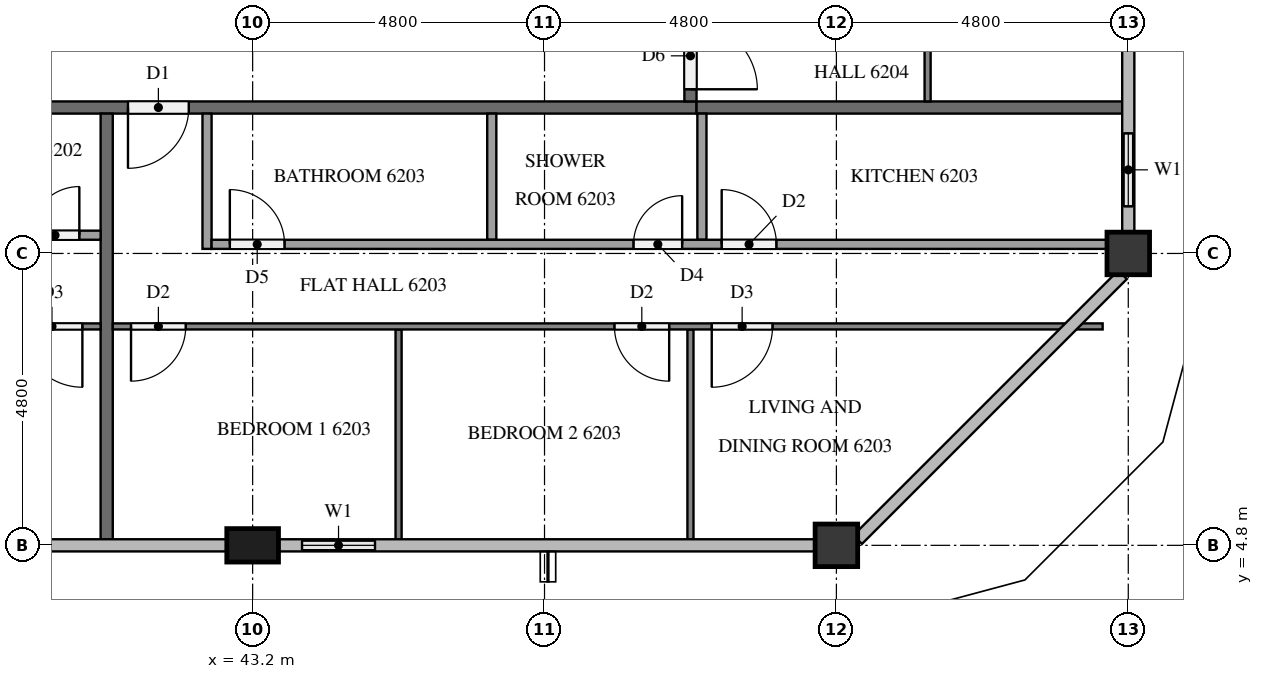
"""IFC4 building model, lengths in metres.
Left out: names, types, materials, properties, quantities, classifications, styles, units other than length and angle.
Written with IfcOpenShell. Run it as: python <this file> out.ifc"""

import sys

from ifc_helpers import new_model, si_unit, direction, frame, frame_2d, origin, origin_2d, place, context, subcontext, project, spatial, rectangle, extrude, element, fill, save


model = new_model("IFC4")
c1 = context("Model", 3, precision=1e-05, world=origin(), true_north=direction((0.0, 1.0)))
c2 = subcontext(c1, "Body", "Model", "MODEL_VIEW")
j1 = project(units=[si_unit("LENGTHUNIT", "METRE"), si_unit("PLANEANGLEUNIT", "RADIAN")], contexts=[c1])
p1 = place(None, origin())
s1 = spatial("IfcSite", under=j1, at=p1, CompositionType="ELEMENT")
p2 = place(p1, origin())
s2 = spatial("IfcBuilding", under=s1, at=p2, CompositionType="ELEMENT")
p3 = place(p2, frame((0.0, 0.0, 238.7)))
s3 = spatial("IfcBuildingStorey", under=s2, at=p3, CompositionType="ELEMENT", Elevation=238.7)
p4 = place(p3, frame((43.2, 4.8, 0.0), z_axis=(0.0, 0.0, 1.0), x_axis=(1.0, 0.0, 0.0)))
e1 = element("IfcColumn", 1, at=p4, inside=s3, PredefinedType="COLUMN", context=c2, shape_type="SweptSolid", body=[
    extrude(rectangle(XDim=0.85, YDim=0.55, at=origin_2d()), origin(), (0.0, 0.0, 1.0), 3.2),
])
for number, where, z_axis, x_axis in (
    (2, (52.8, 4.8, 0.0), (0.0, 0.0, 1.0), (1.0, 0.0, 0.0)),
    (3, (57.6, 9.6, 0.0), (0.0, 0.0, 1.0), (1.0, 0.0, 0.0)),
):
    element("IfcColumn", number, at=place(p3, frame(where, z_axis=z_axis, x_axis=x_axis)), inside=s3, PredefinedType="COLUMN", context=c2, shape_type="SweptSolid", body=[
        extrude(rectangle(XDim=0.7, YDim=0.7, at=origin_2d()), origin(), (0.0, 0.0, 1.0), 3.2),
    ])
p5 = place(p3, frame((43.625, 4.8, 0.0), z_axis=(0.0, 0.0, 1.0), x_axis=(1.0, 0.0, 0.0)))
e4 = element("IfcWall", 4, at=p5, inside=s3, PredefinedType="SOLIDWALL", context=c2, shape_type="SweptSolid", body=[
    extrude(rectangle(XDim=1.975, YDim=0.15, at=frame_2d((0.988, 0.0))), origin(), (0.0, 0.0, 1.0), 3.2),
])
p6 = place(p5, frame((0.387, 0.0, 0.9)))
e5 = element("IfcOpeningElement", 5, at=p6, cuts=e4, PredefinedType="OPENING", context=c2, shape_type="SweptSolid", body=[
    extrude(rectangle(XDim=1.2, YDim=1.4, at=frame_2d((0.6, 0.7))), frame((0.0, 0.085, 0.0), z_axis=(0.0, -1.0, 0.0), x_axis=(1.0, 0.0, 0.0)), (0.0, 0.0, 1.0), 0.17),
])
p7 = place(p3, frame((57.6, 9.95, 0.0), z_axis=(0.0, 0.0, 1.0), x_axis=(0.0, 1.0, 0.0)))
e6 = element("IfcWall", 6, at=p7, inside=s3, PredefinedType="SOLIDWALL", context=c2, shape_type="SweptSolid", body=[
    extrude(rectangle(XDim=2.05, YDim=0.15, at=frame_2d((1.025, 0.0))), origin(), (0.0, 0.0, 1.0), 3.2),
])
p8 = place(p7, frame((0.425, 0.0, 0.9)))
e7 = element("IfcOpeningElement", 7, at=p8, cuts=e6, PredefinedType="OPENING", context=c2, shape_type="SweptSolid", body=[
    extrude(rectangle(XDim=1.2, YDim=1.4, at=frame_2d((0.6, 0.7))), frame((0.0, 0.085, 0.0), z_axis=(0.0, -1.0, 0.0), x_axis=(1.0, 0.0, 0.0)), (0.0, 0.0, 1.0), 0.17),
])
p9 = place(p3, frame((50.5, 12.0, 0.0), z_axis=(0.0, 0.0, 1.0), x_axis=(-1.0, 0.0, 0.0)))
e8 = element("IfcWall", 8, at=p9, inside=s3, PredefinedType="PARTITIONING", context=c2, shape_type="SweptSolid", body=[
    extrude(rectangle(XDim=38.6, YDim=0.2, at=frame_2d((19.3, 0.0))), origin(), (0.0, 0.0, 1.0), 3.2),
])
p10 = place(p9, frame((37.1, 0.0, 0.0)))
e9 = element("IfcOpeningElement", 9, at=p10, cuts=e8, PredefinedType="OPENING", context=c2, shape_type="SweptSolid", body=[
    extrude(rectangle(XDim=1.1, YDim=2.1, at=frame_2d((0.55, 1.05))), frame((0.0, 0.11, 0.0), z_axis=(0.0, -1.0, 0.0), x_axis=(1.0, 0.0, 0.0)), (0.0, 0.0, 1.0), 0.22),
])
p11 = place(p9, frame((17.95, 0.0, 0.0)))
e10 = element("IfcOpeningElement", 10, at=p11, cuts=e8, PredefinedType="OPENING", context=c2, shape_type="SweptSolid", body=[
    extrude(rectangle(XDim=1.0, YDim=2.1, at=frame_2d((0.5, 1.05))), frame((0.0, 0.11, 0.0), z_axis=(0.0, -1.0, 0.0), x_axis=(1.0, 0.0, 0.0)), (0.0, 0.0, 1.0), 0.22),
])
p12 = place(p9, frame((8.35, 0.0, 0.0)))
e11 = element("IfcOpeningElement", 11, at=p12, cuts=e8, PredefinedType="OPENING", context=c2, shape_type="SweptSolid", body=[
    extrude(rectangle(XDim=1.0, YDim=2.1, at=frame_2d((0.5, 1.05))), frame((0.0, 0.11, 0.0), z_axis=(0.0, -1.0, 0.0), x_axis=(1.0, 0.0, 0.0)), (0.0, 0.0, 1.0), 0.22),
])
p13 = place(p3, frame((50.4, 40.7, 0.0), z_axis=(0.0, 0.0, 1.0), x_axis=(0.0, -1.0, 0.0)))
e12 = element("IfcWall", 12, at=p13, inside=s3, PredefinedType="PARTITIONING", context=c2, shape_type="SweptSolid", body=[
    extrude(rectangle(XDim=28.6, YDim=0.2, at=frame_2d((14.3, 0.0))), origin(), (0.0, 0.0, 1.0), 3.2),
])
p14 = place(p13, frame((27.3, 0.0, 0.0)))
e13 = element("IfcOpeningElement", 13, at=p14, cuts=e12, PredefinedType="OPENING", context=c2, shape_type="SweptSolid", body=[
    extrude(rectangle(XDim=1.1, YDim=2.1, at=frame_2d((0.55, 1.05))), frame((0.0, 0.11, 0.0), z_axis=(0.0, -1.0, 0.0), x_axis=(1.0, 0.0, 0.0)), (0.0, 0.0, 1.0), 0.22),
])
p15 = place(p13, frame((0.25, 0.0, 0.0)))
e14 = element("IfcOpeningElement", 14, at=p15, cuts=e12, PredefinedType="OPENING", context=c2, shape_type="SweptSolid", body=[
    extrude(rectangle(XDim=1.0, YDim=2.1, at=frame_2d((0.5, 1.05))), frame((0.0, 0.11, 0.0), z_axis=(0.0, -1.0, 0.0), x_axis=(1.0, 0.0, 0.0)), (0.0, 0.0, 1.0), 0.22),
])
for number, where, z_axis, x_axis in (
    (15, (40.8, 11.9, 0.0), (0.0, 0.0, 1.0), (0.0, -1.0, 0.0)),
    (16, (50.5, 12.0, 0.0), (0.0, 0.0, 1.0), (1.0, 0.0, 0.0)),
):
    element("IfcWall", number, at=place(p3, frame(where, z_axis=z_axis, x_axis=x_axis)), inside=s3, PredefinedType="PARTITIONING", context=c2, shape_type="SweptSolid", body=[
        extrude(rectangle(XDim=7.0, YDim=0.2, at=frame_2d((3.5, 0.0))), origin(), (0.0, 0.0, 1.0), 3.2),
    ])
p16 = place(p3, frame((40.7, 8.4, 0.0), z_axis=(0.0, 0.0, 1.0), x_axis=(-1.0, 0.0, 0.0)))
e17 = element("IfcWall", 17, at=p16, inside=s3, PredefinedType="PARTITIONING", context=c2, shape_type="SweptSolid", body=[
    extrude(rectangle(XDim=9.4, YDim=0.1, at=frame_2d((4.7, 0.0))), origin(), (0.0, 0.0, 1.0), 3.2),
])
p17 = place(p16, frame((8.2, 0.0, 0.0)))
e18 = element("IfcOpeningElement", 18, at=p17, cuts=e17, PredefinedType="OPENING", context=c2, shape_type="SweptSolid", body=[
    extrude(rectangle(XDim=0.9, YDim=2.1, at=frame_2d((0.45, 1.05))), frame((0.0, 0.06, 0.0), z_axis=(0.0, -1.0, 0.0), x_axis=(1.0, 0.0, 0.0)), (0.0, 0.0, 1.0), 0.12),
])
p18 = place(p16, frame((0.3, 0.0, 0.0)))
e19 = element("IfcOpeningElement", 19, at=p18, cuts=e17, PredefinedType="OPENING", context=c2, shape_type="SweptSolid", body=[
    extrude(rectangle(XDim=1.0, YDim=2.1, at=frame_2d((0.5, 1.05))), frame((0.0, 0.06, 0.0), z_axis=(0.0, -1.0, 0.0), x_axis=(1.0, 0.0, 0.0)), (0.0, 0.0, 1.0), 0.12),
])
p19 = place(p3, frame((32.925, 9.9, 0.0), z_axis=(0.0, 0.0, 1.0), x_axis=(1.0, 0.0, 0.0)))
e20 = element("IfcWall", 20, at=p19, inside=s3, PredefinedType="PARTITIONING", context=c2, shape_type="SweptSolid", body=[
    extrude(rectangle(XDim=7.775, YDim=0.15, at=frame_2d((3.887, 0.0))), origin(), (0.0, 0.0, 1.0), 3.2),
])
p20 = place(p19, frame((0.3, 0.0, 0.0)))
e21 = element("IfcOpeningElement", 21, at=p20, cuts=e20, PredefinedType="OPENING", context=c2, shape_type="SweptSolid", body=[
    extrude(rectangle(XDim=0.9, YDim=2.1, at=frame_2d((0.45, 1.05))), frame((0.0, 0.085, 0.0), z_axis=(0.0, -1.0, 0.0), x_axis=(1.0, 0.0, 0.0)), (0.0, 0.0, 1.0), 0.17),
])
p21 = place(p19, frame((6.625, 0.0, 0.0)))
e22 = element("IfcOpeningElement", 22, at=p21, cuts=e20, PredefinedType="OPENING", context=c2, shape_type="SweptSolid", body=[
    extrude(rectangle(XDim=0.8, YDim=2.1, at=frame_2d((0.4, 1.05))), frame((0.0, 0.085, 0.0), z_axis=(0.0, -1.0, 0.0), x_axis=(1.0, 0.0, 0.0)), (0.0, 0.0, 1.0), 0.17),
])
for number, where, z_axis, x_axis in (
    (23, (45.6, 8.35, 0.0), (0.0, 0.0, 1.0), (0.0, -1.0, 0.0)),
    (24, (50.4, 8.35, 0.0), (0.0, 0.0, 1.0), (0.0, -1.0, 0.0)),
):
    element("IfcWall", number, at=place(p3, frame(where, z_axis=z_axis, x_axis=x_axis)), inside=s3, PredefinedType="PARTITIONING", context=c2, shape_type="SweptSolid", body=[
        extrude(rectangle(XDim=3.45, YDim=0.1, at=frame_2d((1.725, 0.0))), origin(), (0.0, 0.0, 1.0), 3.2),
    ])
p22 = place(p3, frame((57.178, 8.4, 0.0), z_axis=(0.0, 0.0, 1.0), x_axis=(-1.0, 0.0, 0.0)))
e25 = element("IfcWall", 25, at=p22, inside=s3, PredefinedType="PARTITIONING", context=c2, shape_type="SweptSolid", body=[
    extrude(rectangle(XDim=16.279, YDim=0.1, at=frame_2d((8.139, 0.0))), origin(), (0.0, 0.0, 1.0), 3.2),
])
p23 = place(p22, frame((15.079, 0.0, 0.0)))
e26 = element("IfcOpeningElement", 26, at=p23, cuts=e25, PredefinedType="OPENING", context=c2, shape_type="SweptSolid", body=[
    extrude(rectangle(XDim=0.9, YDim=2.1, at=frame_2d((0.45, 1.05))), frame((0.0, 0.06, 0.0), z_axis=(0.0, -1.0, 0.0), x_axis=(1.0, 0.0, 0.0)), (0.0, 0.0, 1.0), 0.12),
])
p24 = place(p22, frame((7.128, 0.0, 0.0)))
e27 = element("IfcOpeningElement", 27, at=p24, cuts=e25, PredefinedType="OPENING", context=c2, shape_type="SweptSolid", body=[
    extrude(rectangle(XDim=0.9, YDim=2.1, at=frame_2d((0.45, 1.05))), frame((0.0, 0.06, 0.0), z_axis=(0.0, -1.0, 0.0), x_axis=(1.0, 0.0, 0.0)), (0.0, 0.0, 1.0), 0.12),
])
p25 = place(p22, frame((5.428, 0.0, 0.0)))
e28 = element("IfcOpeningElement", 28, at=p25, cuts=e25, PredefinedType="OPENING", context=c2, shape_type="SweptSolid", body=[
    extrude(rectangle(XDim=1.0, YDim=2.1, at=frame_2d((0.5, 1.05))), frame((0.0, 0.06, 0.0), z_axis=(0.0, -1.0, 0.0), x_axis=(1.0, 0.0, 0.0)), (0.0, 0.0, 1.0), 0.12),
])
for number, where, z_axis, x_axis in (
    (29, (47.133, 11.9, 0.0), (0.0, 0.0, 1.0), (0.0, -1.0, 0.0)),
    (30, (50.588, 11.9, 0.0), (0.0, 0.0, 1.0), (0.0, -1.0, 0.0)),
):
    element("IfcWall", number, at=place(p3, frame(where, z_axis=z_axis, x_axis=x_axis)), inside=s3, PredefinedType="PARTITIONING", context=c2, shape_type="SweptSolid", body=[
        extrude(rectangle(XDim=2.075, YDim=0.15, at=frame_2d((1.038, 0.0))), origin(), (0.0, 0.0, 1.0), 3.2),
    ])
p26 = place(p3, frame((42.45, 11.9, 0.0), z_axis=(0.0, 0.0, 1.0), x_axis=(0.0, -1.0, 0.0)))
e31 = element("IfcWall", 31, at=p26, inside=s3, PredefinedType="PARTITIONING", context=c2, shape_type="SweptSolid", body=[
    extrude(rectangle(XDim=2.225, YDim=0.15, at=frame_2d((1.112, 0.0))), origin(), (0.0, 0.0, 1.0), 3.2),
])
p27 = place(p3, frame((42.525, 9.75, 0.0), z_axis=(0.0, 0.0, 1.0), x_axis=(1.0, 0.0, 0.0)))
e32 = element("IfcWall", 32, at=p27, inside=s3, PredefinedType="PARTITIONING", context=c2, shape_type="SweptSolid", body=[
    extrude(rectangle(XDim=14.725, YDim=0.15, at=frame_2d((7.363, 0.0))), origin(), (0.0, 0.0, 1.0), 3.2),
])
p28 = place(p27, frame((0.3, 0.0, 0.0)))
e33 = element("IfcOpeningElement", 33, at=p28, cuts=e32, PredefinedType="OPENING", context=c2, shape_type="SweptSolid", body=[
    extrude(rectangle(XDim=0.9, YDim=2.1, at=frame_2d((0.45, 1.05))), frame((0.0, 0.085, 0.0), z_axis=(0.0, -1.0, 0.0), x_axis=(1.0, 0.0, 0.0)), (0.0, 0.0, 1.0), 0.17),
])
p29 = place(p27, frame((6.938, 0.0, 0.0)))
e34 = element("IfcOpeningElement", 34, at=p29, cuts=e32, PredefinedType="OPENING", context=c2, shape_type="SweptSolid", body=[
    extrude(rectangle(XDim=0.8, YDim=2.1, at=frame_2d((0.4, 1.05))), frame((0.0, 0.085, 0.0), z_axis=(0.0, -1.0, 0.0), x_axis=(1.0, 0.0, 0.0)), (0.0, 0.0, 1.0), 0.17),
])
p30 = place(p27, frame((8.388, 0.0, 0.0)))
e35 = element("IfcOpeningElement", 35, at=p30, cuts=e32, PredefinedType="OPENING", context=c2, shape_type="SweptSolid", body=[
    extrude(rectangle(XDim=0.9, YDim=2.1, at=frame_2d((0.45, 1.05))), frame((0.0, 0.085, 0.0), z_axis=(0.0, -1.0, 0.0), x_axis=(1.0, 0.0, 0.0)), (0.0, 0.0, 1.0), 0.17),
])
p31 = place(p3, frame((54.3, 31.1, 0.0), z_axis=(0.0, 0.0, 1.0), x_axis=(0.0, -1.0, 0.0)))
e36 = element("IfcWall", 36, at=p31, inside=s3, PredefinedType="PARTITIONING", context=c2, shape_type="SweptSolid", body=[
    extrude(rectangle(XDim=19.0, YDim=0.1, at=frame_2d((9.5, 0.0))), origin(), (0.0, 0.0, 1.0), 3.2),
])
p32 = place(p31, frame((14.65, 0.0, 0.0)))
e37 = element("IfcOpeningElement", 37, at=p32, cuts=e36, PredefinedType="OPENING", context=c2, shape_type="SweptSolid", body=[
    extrude(rectangle(XDim=0.9, YDim=2.1, at=frame_2d((0.45, 1.05))), frame((0.0, 0.06, 0.0), z_axis=(0.0, -1.0, 0.0), x_axis=(1.0, 0.0, 0.0)), (0.0, 0.0, 1.0), 0.12),
])
p33 = place(p31, frame((12.95, 0.0, 0.0)))
e38 = element("IfcOpeningElement", 38, at=p33, cuts=e36, PredefinedType="OPENING", context=c2, shape_type="SweptSolid", body=[
    extrude(rectangle(XDim=1.0, YDim=2.1, at=frame_2d((0.5, 1.05))), frame((0.0, 0.06, 0.0), z_axis=(0.0, -1.0, 0.0), x_axis=(1.0, 0.0, 0.0)), (0.0, 0.0, 1.0), 0.12),
])
p34 = place(p31, frame((5.05, 0.0, 0.0)))
e39 = element("IfcOpeningElement", 39, at=p34, cuts=e36, PredefinedType="OPENING", context=c2, shape_type="SweptSolid", body=[
    extrude(rectangle(XDim=0.9, YDim=2.1, at=frame_2d((0.45, 1.05))), frame((0.0, 0.06, 0.0), z_axis=(0.0, -1.0, 0.0), x_axis=(1.0, 0.0, 0.0)), (0.0, 0.0, 1.0), 0.12),
])
p35 = place(p31, frame((3.45, 0.0, 0.0)))
e40 = element("IfcOpeningElement", 40, at=p35, cuts=e36, PredefinedType="OPENING", context=c2, shape_type="SweptSolid", body=[
    extrude(rectangle(XDim=0.9, YDim=2.1, at=frame_2d((0.45, 1.05))), frame((0.0, 0.06, 0.0), z_axis=(0.0, -1.0, 0.0), x_axis=(1.0, 0.0, 0.0)), (0.0, 0.0, 1.0), 0.12),
])
p36 = place(p6, origin())
e41 = element("IfcWindow", 41, at=p36, inside=s3, PartitioningType="SINGLE_PANEL", PredefinedType="WINDOW", context=c2, shape_type="SweptSolid", body=[
    extrude(rectangle(XDim=1.2, YDim=1.4, at=frame_2d((0.6, 0.7))), frame((0.0, 0.03, 0.0), z_axis=(0.0, -1.0, 0.0), x_axis=(1.0, 0.0, 0.0)), (0.0, 0.0, 1.0), 0.06),
])
fill(e5, e41)
p37 = place(p8, origin())
e42 = element("IfcWindow", 42, at=p37, inside=s3, PartitioningType="SINGLE_PANEL", PredefinedType="WINDOW", context=c2, shape_type="SweptSolid", body=[
    extrude(rectangle(XDim=1.2, YDim=1.4, at=frame_2d((0.6, 0.7))), frame((0.0, 0.03, 0.0), z_axis=(0.0, -1.0, 0.0), x_axis=(1.0, 0.0, 0.0)), (0.0, 0.0, 1.0), 0.06),
])
fill(e7, e42)
p38 = place(p12, origin())
e43 = element("IfcDoor", 43, at=p38, inside=s3, OperationType="SINGLE_SWING_RIGHT", PredefinedType="DOOR", context=c2, shape_type="SweptSolid", body=[
    extrude(rectangle(XDim=1.0, YDim=2.1, at=frame_2d((0.5, 1.05))), frame((0.0, 0.025, 0.0), z_axis=(0.0, -1.0, 0.0), x_axis=(1.0, 0.0, 0.0)), (0.0, 0.0, 1.0), 0.05),
])
fill(e11, e43)
p39 = place(p14, origin())
e44 = element("IfcDoor", 44, at=p39, inside=s3, OperationType="SINGLE_SWING_RIGHT", PredefinedType="DOOR", context=c2, shape_type="SweptSolid", body=[
    extrude(rectangle(XDim=1.1, YDim=2.1, at=frame_2d((0.55, 1.05))), frame((0.0, 0.025, 0.0), z_axis=(0.0, -1.0, 0.0), x_axis=(1.0, 0.0, 0.0)), (0.0, 0.0, 1.0), 0.05),
])
fill(e13, e44)
p40 = place(p18, origin())
e45 = element("IfcDoor", 45, at=p40, inside=s3, OperationType="SINGLE_SWING_LEFT", PredefinedType="DOOR", context=c2, shape_type="SweptSolid", body=[
    extrude(rectangle(XDim=1.0, YDim=2.1, at=frame_2d((0.5, 1.05))), frame((0.0, 0.025, 0.0), z_axis=(0.0, -1.0, 0.0), x_axis=(1.0, 0.0, 0.0)), (0.0, 0.0, 1.0), 0.05),
])
fill(e19, e45)
p41 = place(p21, origin())
e46 = element("IfcDoor", 46, at=p41, inside=s3, OperationType="SINGLE_SWING_RIGHT", PredefinedType="DOOR", context=c2, shape_type="SweptSolid", body=[
    extrude(rectangle(XDim=0.8, YDim=2.1, at=frame_2d((0.4, 1.05))), frame((0.0, 0.025, 0.0), z_axis=(0.0, -1.0, 0.0), x_axis=(1.0, 0.0, 0.0)), (0.0, 0.0, 1.0), 0.05),
])
fill(e22, e46)
p42 = place(p23, origin())
e47 = element("IfcDoor", 47, at=p42, inside=s3, OperationType="SINGLE_SWING_RIGHT", PredefinedType="DOOR", context=c2, shape_type="SweptSolid", body=[
    extrude(rectangle(XDim=0.9, YDim=2.1, at=frame_2d((0.45, 1.05))), frame((0.0, 0.025, 0.0), z_axis=(0.0, -1.0, 0.0), x_axis=(1.0, 0.0, 0.0)), (0.0, 0.0, 1.0), 0.05),
])
fill(e26, e47)
p43 = place(p24, origin())
e48 = element("IfcDoor", 48, at=p43, inside=s3, OperationType="SINGLE_SWING_LEFT", PredefinedType="DOOR", context=c2, shape_type="SweptSolid", body=[
    extrude(rectangle(XDim=0.9, YDim=2.1, at=frame_2d((0.45, 1.05))), frame((0.0, 0.025, 0.0), z_axis=(0.0, -1.0, 0.0), x_axis=(1.0, 0.0, 0.0)), (0.0, 0.0, 1.0), 0.05),
])
fill(e27, e48)
p44 = place(p25, origin())
e49 = element("IfcDoor", 49, at=p44, inside=s3, OperationType="SINGLE_SWING_RIGHT", PredefinedType="DOOR", context=c2, shape_type="SweptSolid", body=[
    extrude(rectangle(XDim=1.0, YDim=2.1, at=frame_2d((0.5, 1.05))), frame((0.0, 0.025, 0.0), z_axis=(0.0, -1.0, 0.0), x_axis=(1.0, 0.0, 0.0)), (0.0, 0.0, 1.0), 0.05),
])
fill(e28, e49)
p45 = place(p28, origin())
e50 = element("IfcDoor", 50, at=p45, inside=s3, OperationType="SINGLE_SWING_LEFT", PredefinedType="DOOR", context=c2, shape_type="SweptSolid", body=[
    extrude(rectangle(XDim=0.9, YDim=2.1, at=frame_2d((0.45, 1.05))), frame((0.0, 0.025, 0.0), z_axis=(0.0, -1.0, 0.0), x_axis=(1.0, 0.0, 0.0)), (0.0, 0.0, 1.0), 0.05),
])
fill(e33, e50)
p46 = place(p29, origin())
e51 = element("IfcDoor", 51, at=p46, inside=s3, OperationType="SINGLE_SWING_RIGHT", PredefinedType="DOOR", context=c2, shape_type="SweptSolid", body=[
    extrude(rectangle(XDim=0.8, YDim=2.1, at=frame_2d((0.4, 1.05))), frame((0.0, 0.025, 0.0), z_axis=(0.0, -1.0, 0.0), x_axis=(1.0, 0.0, 0.0)), (0.0, 0.0, 1.0), 0.05),
])
fill(e34, e51)
p47 = place(p30, origin())
e52 = element("IfcDoor", 52, at=p47, inside=s3, OperationType="SINGLE_SWING_LEFT", PredefinedType="DOOR", context=c2, shape_type="SweptSolid", body=[
    extrude(rectangle(XDim=0.9, YDim=2.1, at=frame_2d((0.45, 1.05))), frame((0.0, 0.025, 0.0), z_axis=(0.0, -1.0, 0.0), x_axis=(1.0, 0.0, 0.0)), (0.0, 0.0, 1.0), 0.05),
])
fill(e35, e52)
save(model, sys.argv[1])
